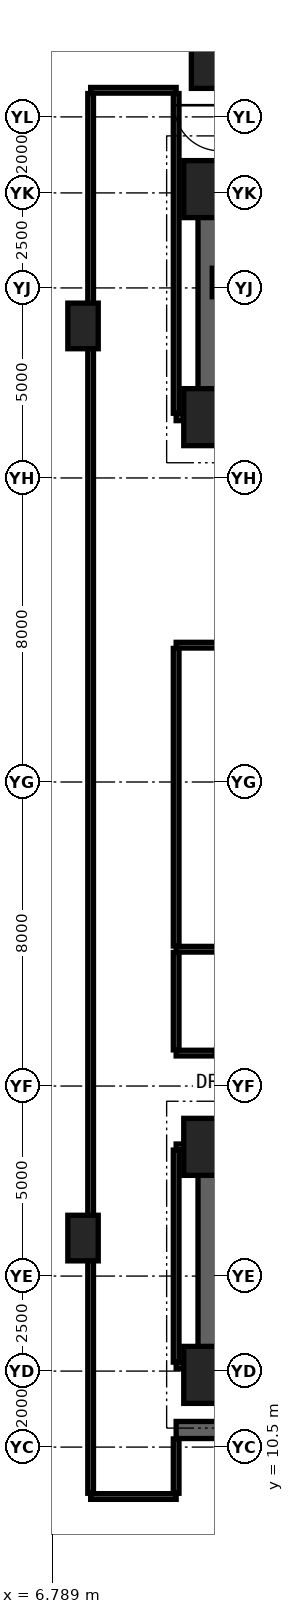
"""IFC4 building model, lengths in metres.
Left out: names, types, materials, properties, quantities, classifications, styles, units other than length and angle.
Written with IfcOpenShell. Run it as: python <this file> out.ifc"""

import sys

from ifc_helpers import new_model, si_unit, direction, frame, frame_2d, origin, origin_2d, place, context, subcontext, project, spatial, rectangle, extrude, element, fill, save


model = new_model("IFC4")
c1 = context("Model", 3, precision=1e-05, world=origin(), true_north=direction((0.0, 1.0)))
c2 = subcontext(c1, "Body", "Model", "MODEL_VIEW")
j1 = project(units=[si_unit("LENGTHUNIT", "METRE"), si_unit("PLANEANGLEUNIT", "RADIAN")], contexts=[c1])
p1 = place(None, origin())
s1 = spatial("IfcSite", under=j1, at=p1, CompositionType="ELEMENT")
p2 = place(p1, origin())
s2 = spatial("IfcBuilding", under=s1, at=p2, CompositionType="ELEMENT")
p3 = place(p2, frame((0.0, 0.0, 5.2)))
s3 = spatial("IfcBuildingStorey", under=s2, at=p3, CompositionType="ELEMENT", Elevation=5.2)
for number, where, z_axis, x_axis in (
    (1, (11.0, 12.4, 0.0), (0.0, 0.0, 1.0), (1.0, 0.0, 0.0)),
    (2, (11.0, 18.4, 0.0), (0.0, 0.0, 1.0), (1.0, 0.0, 0.0)),
    (3, (11.0, 37.6, 0.0), (0.0, 0.0, 1.0), (1.0, 0.0, 0.0)),
    (4, (11.0, 43.6, 0.0), (0.0, 0.0, 1.0), (1.0, 0.0, 0.0)),
):
    element("IfcColumn", number, at=place(p3, frame(where, z_axis=z_axis, x_axis=x_axis)), inside=s3, PredefinedType="COLUMN", context=c2, shape_type="SweptSolid", body=[
        extrude(rectangle(XDim=1.5, YDim=1.5, at=origin_2d()), origin(), (0.0, 0.0, 1.0), 4.3),
    ])
for number, where, z_axis, x_axis in (
    (5, (7.6, 16.0, 0.0), (0.0, 0.0, 1.0), (1.0, 0.0, 0.0)),
    (6, (7.6, 40.0, 0.0), (0.0, 0.0, 1.0), (1.0, 0.0, 0.0)),
):
    element("IfcColumn", number, at=place(p3, frame(where, z_axis=z_axis, x_axis=x_axis)), inside=s3, PredefinedType="PILASTER", context=c2, shape_type="SweptSolid", body=[
        extrude(rectangle(XDim=0.8, YDim=1.2, at=origin_2d()), origin(), (0.0, 0.0, 1.0), 4.3),
    ])
p4 = place(p3, frame((11.0, 43.6, 0.0), z_axis=(0.0, 0.0, 1.0), x_axis=(1.0, 0.0, 0.0)))
e7 = element("IfcWall", 7, at=p4, inside=s3, PredefinedType="SHEAR", context=c2, shape_type="SweptSolid", body=[
    extrude(rectangle(XDim=19.0, YDim=0.75, at=frame_2d((9.5, 0.0))), origin(), (0.0, 0.0, 1.0), 3.98),
])
p5 = place(p3, frame((11.0, 37.6, 0.0), z_axis=(0.0, 0.0, 1.0), x_axis=(0.0, 1.0, 0.0)))
e8 = element("IfcWall", 8, at=p5, inside=s3, PredefinedType="SHEAR", context=c2, shape_type="SweptSolid", body=[
    extrude(rectangle(XDim=6.0, YDim=0.75, at=frame_2d((3.0, 0.0))), origin(), (0.0, 0.0, 1.0), 3.98),
])
p6 = place(p3, frame((11.0, 37.6, 0.0), z_axis=(0.0, 0.0, 1.0), x_axis=(1.0, 0.0, 0.0)))
e9 = element("IfcWall", 9, at=p6, inside=s3, PredefinedType="SHEAR", context=c2, shape_type="SweptSolid", body=[
    extrude(rectangle(XDim=19.0, YDim=0.75, at=frame_2d((9.5, 0.0))), origin(), (0.0, 0.0, 1.0), 3.98),
])
p7 = place(p6, frame((1.07, 0.0, 0.0)))
e10 = element("IfcOpeningElement", 10, at=p7, cuts=e9, PredefinedType="OPENING", context=c2, shape_type="SweptSolid", body=[
    extrude(rectangle(XDim=1.15, YDim=2.2, at=frame_2d((0.575, 1.1))), frame((0.0, 0.385, 0.0), z_axis=(0.0, -1.0, 0.0), x_axis=(1.0, 0.0, 0.0)), (0.0, 0.0, 1.0), 0.77),
])
p8 = place(p6, frame((9.55, 0.0, 0.0)))
e11 = element("IfcOpeningElement", 11, at=p8, cuts=e9, PredefinedType="OPENING", context=c2, shape_type="SweptSolid", body=[
    extrude(rectangle(XDim=1.4, YDim=2.35, at=frame_2d((0.7, 1.175))), frame((0.0, 0.385, 0.0), z_axis=(0.0, -1.0, 0.0), x_axis=(1.0, 0.0, 0.0)), (0.0, 0.0, 1.0), 0.77),
])
p9 = place(p6, frame((11.95, 0.0, 0.0)))
e12 = element("IfcOpeningElement", 12, at=p9, cuts=e9, PredefinedType="OPENING", context=c2, shape_type="SweptSolid", body=[
    extrude(rectangle(XDim=1.4, YDim=2.35, at=frame_2d((0.7, 1.175))), frame((0.0, 0.385, 0.0), z_axis=(0.0, -1.0, 0.0), x_axis=(1.0, 0.0, 0.0)), (0.0, 0.0, 1.0), 0.77),
])
p10 = place(p6, frame((14.4, 0.0, 0.0)))
e13 = element("IfcOpeningElement", 13, at=p10, cuts=e9, PredefinedType="OPENING", context=c2, shape_type="SweptSolid", body=[
    extrude(rectangle(XDim=1.3, YDim=2.3, at=frame_2d((0.65, 1.15))), frame((0.0, 0.385, 0.0), z_axis=(0.0, -1.0, 0.0), x_axis=(1.0, 0.0, 0.0)), (0.0, 0.0, 1.0), 0.77),
])
p11 = place(p6, frame((16.6, 0.0, 0.0)))
e14 = element("IfcOpeningElement", 14, at=p11, cuts=e9, PredefinedType="OPENING", context=c2, shape_type="SweptSolid", body=[
    extrude(rectangle(XDim=1.3, YDim=2.3, at=frame_2d((0.65, 1.15))), frame((0.0, 0.385, 0.0), z_axis=(0.0, -1.0, 0.0), x_axis=(1.0, 0.0, 0.0)), (0.0, 0.0, 1.0), 0.77),
])
p12 = place(p3, frame((11.0, 41.143, 0.0), z_axis=(0.0, 0.0, 1.0), x_axis=(1.0, 0.0, 0.0)))
e15 = element("IfcWall", 15, at=p12, inside=s3, PredefinedType="SHEAR", context=c2, shape_type="SweptSolid", body=[
    extrude(rectangle(XDim=9.0, YDim=0.75, at=frame_2d((4.5, 0.0))), origin(), (0.0, 0.0, 1.0), 3.98),
])
p13 = place(p3, frame((11.0, 12.4, 0.0), z_axis=(0.0, 0.0, 1.0), x_axis=(1.0, 0.0, 0.0)))
e16 = element("IfcWall", 16, at=p13, inside=s3, PredefinedType="SHEAR", context=c2, shape_type="SweptSolid", body=[
    extrude(rectangle(XDim=19.0, YDim=0.75, at=frame_2d((9.5, 0.0))), origin(), (0.0, 0.0, 1.0), 3.98),
])
p14 = place(p3, frame((11.0, 12.4, 0.0), z_axis=(0.0, 0.0, 1.0), x_axis=(0.0, 1.0, 0.0)))
e17 = element("IfcWall", 17, at=p14, inside=s3, PredefinedType="SHEAR", context=c2, shape_type="SweptSolid", body=[
    extrude(rectangle(XDim=6.0, YDim=0.75, at=frame_2d((3.0, 0.0))), origin(), (0.0, 0.0, 1.0), 3.98),
])
p15 = place(p3, frame((11.0, 18.4, 0.0), z_axis=(0.0, 0.0, 1.0), x_axis=(1.0, 0.0, 0.0)))
e18 = element("IfcWall", 18, at=p15, inside=s3, PredefinedType="SHEAR", context=c2, shape_type="SweptSolid", body=[
    extrude(rectangle(XDim=19.0, YDim=0.75, at=frame_2d((9.5, 0.0))), origin(), (0.0, 0.0, 1.0), 3.98),
])
p16 = place(p15, frame((4.175, 0.0, 0.0)))
e19 = element("IfcOpeningElement", 19, at=p16, cuts=e18, PredefinedType="OPENING", context=c2, shape_type="SweptSolid", body=[
    extrude(rectangle(XDim=1.2, YDim=2.25, at=frame_2d((0.6, 1.125))), frame((0.0, 0.385, 0.0), z_axis=(0.0, -1.0, 0.0), x_axis=(1.0, 0.0, 0.0)), (0.0, 0.0, 1.0), 0.77),
])
p17 = place(p15, frame((9.6, 0.0, 0.0)))
e20 = element("IfcOpeningElement", 20, at=p17, cuts=e18, PredefinedType="OPENING", context=c2, shape_type="SweptSolid", body=[
    extrude(rectangle(XDim=1.3, YDim=2.3, at=frame_2d((0.65, 1.15))), frame((0.0, 0.385, 0.0), z_axis=(0.0, -1.0, 0.0), x_axis=(1.0, 0.0, 0.0)), (0.0, 0.0, 1.0), 0.77),
])
p18 = place(p15, frame((11.9, 0.0, 0.0)))
e21 = element("IfcOpeningElement", 21, at=p18, cuts=e18, PredefinedType="OPENING", context=c2, shape_type="SweptSolid", body=[
    extrude(rectangle(XDim=1.3, YDim=2.3, at=frame_2d((0.65, 1.15))), frame((0.0, 0.385, 0.0), z_axis=(0.0, -1.0, 0.0), x_axis=(1.0, 0.0, 0.0)), (0.0, 0.0, 1.0), 0.77),
])
p19 = place(p15, frame((14.3, 0.0, 0.0)))
e22 = element("IfcOpeningElement", 22, at=p19, cuts=e18, PredefinedType="OPENING", context=c2, shape_type="SweptSolid", body=[
    extrude(rectangle(XDim=1.3, YDim=2.3, at=frame_2d((0.65, 1.15))), frame((0.0, 0.385, 0.0), z_axis=(0.0, -1.0, 0.0), x_axis=(1.0, 0.0, 0.0)), (0.0, 0.0, 1.0), 0.77),
])
p20 = place(p15, frame((16.6, 0.0, 0.0)))
e23 = element("IfcOpeningElement", 23, at=p20, cuts=e18, PredefinedType="OPENING", context=c2, shape_type="SweptSolid", body=[
    extrude(rectangle(XDim=1.3, YDim=2.3, at=frame_2d((0.65, 1.15))), frame((0.0, 0.385, 0.0), z_axis=(0.0, -1.0, 0.0), x_axis=(1.0, 0.0, 0.0)), (0.0, 0.0, 1.0), 0.77),
])
p21 = place(p3, frame((11.0, 46.8, 0.0), z_axis=(0.0, 0.0, 1.0), x_axis=(1.0, 0.0, 0.0)))
e24 = element("IfcColumn", 24, at=p21, inside=s3, PredefinedType="COLUMN", context=c2, shape_type="SweptSolid", body=[
    extrude(rectangle(XDim=1.1, YDim=1.1, at=origin_2d()), origin(), (0.0, 0.0, 1.0), 4.3),
])
p22 = place(p3, frame((7.8, 9.2, 0.0), z_axis=(0.0, 0.0, 1.0), x_axis=(1.0, 0.0, 0.0)))
e25 = element("IfcWall", 25, at=p22, inside=s3, PredefinedType="PARTITIONING", context=c2, shape_type="SweptSolid", body=[
    extrude(rectangle(XDim=2.25, YDim=0.15, at=frame_2d((1.125, 0.0))), origin(), (0.0, 0.0, 1.0), 3.98),
])
p23 = place(p3, frame((10.05, 10.95, 0.0), z_axis=(0.0, 0.0, 1.0), x_axis=(1.0, 0.0, 0.0)))
e26 = element("IfcWall", 26, at=p23, inside=s3, PredefinedType="SHEAR", context=c2, shape_type="SweptSolid", body=[
    extrude(rectangle(XDim=28.15, YDim=0.45, at=frame_2d((14.075, 0.0))), origin(), (0.0, 0.0, 1.0), 3.98),
])
p24 = place(p23, frame((11.72, 0.0, 0.0)))
e27 = element("IfcOpeningElement", 27, at=p24, cuts=e26, PredefinedType="OPENING", context=c2, shape_type="SweptSolid", body=[
    extrude(rectangle(XDim=1.15, YDim=2.2, at=frame_2d((0.575, 1.1))), frame((0.0, 0.235, 0.0), z_axis=(0.0, -1.0, 0.0), x_axis=(1.0, 0.0, 0.0)), (0.0, 0.0, 1.0), 0.47),
])
p25 = place(p23, frame((23.13, 0.0, 0.0)))
e28 = element("IfcOpeningElement", 28, at=p25, cuts=e26, PredefinedType="OPENING", context=c2, shape_type="SweptSolid", body=[
    extrude(rectangle(XDim=1.2, YDim=2.25, at=frame_2d((0.6, 1.125))), frame((0.0, 0.235, 0.0), z_axis=(0.0, -1.0, 0.0), x_axis=(1.0, 0.0, 0.0)), (0.0, 0.0, 1.0), 0.47),
])
p26 = place(p3, frame((10.05, 12.65, 0.0), z_axis=(0.0, 0.0, 1.0), x_axis=(1.0, 0.0, 0.0)))
e29 = element("IfcWall", 29, at=p26, inside=s3, PredefinedType="PARTITIONING", context=c2, shape_type="SweptSolid", body=[
    extrude(rectangle(XDim=0.58, YDim=0.15, at=frame_2d((0.29, 0.0))), origin(), (0.0, 0.0, 1.0), 3.98),
])
p27 = place(p3, frame((10.05, 18.4, 0.0), z_axis=(0.0, 0.0, 1.0), x_axis=(1.0, 0.0, 0.0)))
e30 = element("IfcWall", 30, at=p27, inside=s3, PredefinedType="PARTITIONING", context=c2, shape_type="SweptSolid", body=[
    extrude(rectangle(XDim=0.58, YDim=0.15, at=frame_2d((0.29, 0.0))), origin(), (0.0, 0.0, 1.0), 2.872),
])
p28 = place(p3, frame((10.05, 20.867, 0.0), z_axis=(0.0, 0.0, 1.0), x_axis=(1.0, 0.0, 0.0)))
e31 = element("IfcWall", 31, at=p28, inside=s3, PredefinedType="PARTITIONING", context=c2, shape_type="SweptSolid", body=[
    extrude(rectangle(XDim=30.35, YDim=0.15, at=frame_2d((15.175, 0.0))), origin(), (0.0, 0.0, 1.0), 2.932),
])
p29 = place(p28, frame((0.995, 0.0, 0.0)))
e32 = element("IfcOpeningElement", 32, at=p29, cuts=e31, PredefinedType="OPENING", context=c2, shape_type="SweptSolid", body=[
    extrude(rectangle(XDim=0.9, YDim=2.1, at=frame_2d((0.45, 1.05))), frame((0.0, 0.085, 0.0), z_axis=(0.0, -1.0, 0.0), x_axis=(1.0, 0.0, 0.0)), (0.0, 0.0, 1.0), 0.17),
])
p30 = place(p28, frame((16.5, 0.0, 0.0)))
e33 = element("IfcOpeningElement", 33, at=p30, cuts=e31, PredefinedType="OPENING", context=c2, shape_type="SweptSolid", body=[
    extrude(rectangle(XDim=1.2, YDim=2.25, at=frame_2d((0.6, 1.125))), frame((0.0, 0.085, 0.0), z_axis=(0.0, -1.0, 0.0), x_axis=(1.0, 0.0, 0.0)), (0.0, 0.0, 1.0), 0.17),
])
p31 = place(p3, frame((10.05, 23.6, 0.0), z_axis=(0.0, 0.0, 1.0), x_axis=(1.0, 0.0, 0.0)))
e34 = element("IfcWall", 34, at=p31, inside=s3, PredefinedType="PARTITIONING", context=c2, shape_type="SweptSolid", body=[
    extrude(rectangle(XDim=2.85, YDim=0.15, at=frame_2d((1.425, 0.0))), origin(), (0.0, 0.0, 1.0), 2.932),
])
p32 = place(p3, frame((10.05, 31.6, 0.0), z_axis=(0.0, 0.0, 1.0), x_axis=(1.0, 0.0, 0.0)))
e35 = element("IfcWall", 35, at=p32, inside=s3, PredefinedType="PARTITIONING", context=c2, shape_type="SweptSolid", body=[
    extrude(rectangle(XDim=4.43, YDim=0.15, at=frame_2d((2.215, 0.0))), origin(), (0.0, 0.0, 1.0), 2.932),
])
p33 = place(p3, frame((10.05, 37.6, 0.0), z_axis=(0.0, 0.0, 1.0), x_axis=(1.0, 0.0, 0.0)))
e36 = element("IfcWall", 36, at=p33, inside=s3, PredefinedType="SHEAR", context=c2, shape_type="SweptSolid", body=[
    extrude(rectangle(XDim=0.185, YDim=0.185, at=frame_2d((0.093, 0.0))), origin(), (0.0, 0.0, 1.0), 3.98),
])
p34 = place(p3, frame((7.8, 46.2, 0.0), z_axis=(0.0, 0.0, 1.0), x_axis=(1.0, 0.0, 0.0)))
e37 = element("IfcWall", 37, at=p34, inside=s3, PredefinedType="PARTITIONING", context=c2, shape_type="SweptSolid", body=[
    extrude(rectangle(XDim=2.25, YDim=0.15, at=frame_2d((1.125, 0.0))), origin(), (0.0, 0.0, 1.0), 3.98),
])
p35 = place(p3, frame((7.8, 9.285, 0.0), z_axis=(0.0, 0.0, 1.0), x_axis=(0.0, 1.0, 0.0)))
e38 = element("IfcWall", 38, at=p35, inside=s3, PredefinedType="PARTITIONING", context=c2, shape_type="SweptSolid", body=[
    extrude(rectangle(XDim=36.83, YDim=0.15, at=frame_2d((18.415, 0.0))), origin(), (0.0, 0.0, 1.0), 2.872),
])
p36 = place(p3, frame((10.05, 9.285, 0.0), z_axis=(0.0, 0.0, 1.0), x_axis=(0.0, 1.0, 0.0)))
e39 = element("IfcWall", 39, at=p36, inside=s3, PredefinedType="PARTITIONING", context=c2, shape_type="SweptSolid", body=[
    extrude(rectangle(XDim=1.43, YDim=0.15, at=frame_2d((0.715, 0.0))), origin(), (0.0, 0.0, 1.0), 3.98),
])
p37 = place(p3, frame((10.05, 12.735, 0.0), z_axis=(0.0, 0.0, 1.0), x_axis=(0.0, 1.0, 0.0)))
e40 = element("IfcWall", 40, at=p37, inside=s3, PredefinedType="PARTITIONING", context=c2, shape_type="SweptSolid", body=[
    extrude(rectangle(XDim=5.58, YDim=0.15, at=frame_2d((2.79, 0.0))), origin(), (0.0, 0.0, 1.0), 2.872),
])
p38 = place(p3, frame((10.05, 20.952, 0.0), z_axis=(0.0, 0.0, 1.0), x_axis=(0.0, 1.0, 0.0)))
e41 = element("IfcWall", 41, at=p38, inside=s3, PredefinedType="PARTITIONING", context=c2, shape_type="SweptSolid", body=[
    extrude(rectangle(XDim=2.563, YDim=0.15, at=frame_2d((1.282, 0.0))), origin(), (0.0, 0.0, 1.0), 3.98),
])
p39 = place(p3, frame((10.05, 23.685, 0.0), z_axis=(0.0, 0.0, 1.0), x_axis=(0.0, 1.0, 0.0)))
e42 = element("IfcWall", 42, at=p39, inside=s3, PredefinedType="PARTITIONING", context=c2, shape_type="SweptSolid", body=[
    extrude(rectangle(XDim=7.83, YDim=0.15, at=frame_2d((3.915, 0.0))), origin(), (0.0, 0.0, 1.0), 3.199),
])
p40 = place(p3, frame((10.05, 37.702, 0.0), z_axis=(0.0, 0.0, 1.0), x_axis=(0.0, 1.0, 0.0)))
e43 = element("IfcWall", 43, at=p40, inside=s3, PredefinedType="PARTITIONING", context=c2, shape_type="SweptSolid", body=[
    extrude(rectangle(XDim=8.413, YDim=0.15, at=frame_2d((4.206, 0.0))), origin(), (0.0, 0.0, 1.0), 2.872),
])
p41 = place(p29, origin())
e44 = element("IfcDoor", 44, at=p41, inside=s3, OperationType="SINGLE_SWING_RIGHT", PredefinedType="DOOR", context=c2, shape_type="SweptSolid", body=[
    extrude(rectangle(XDim=0.9, YDim=2.1, at=frame_2d((0.45, 1.05))), frame((0.0, 0.025, 0.0), z_axis=(0.0, -1.0, 0.0), x_axis=(1.0, 0.0, 0.0)), (0.0, 0.0, 1.0), 0.05),
])
fill(e32, e44)
save(model, sys.argv[1])
